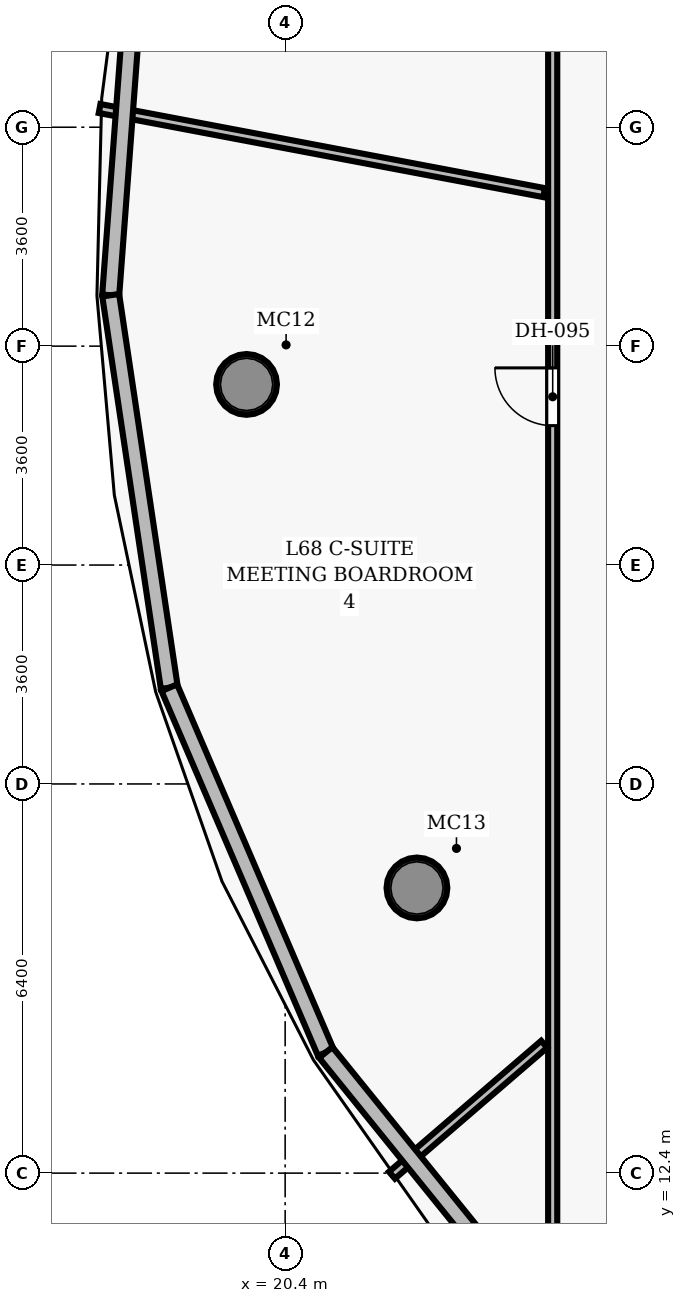
"""IFC4 building model, lengths in metres.
Left out: names, types, materials, properties, quantities, classifications, styles, units other than length and angle.
Written with IfcOpenShell. Run it as: python <this file> out.ifc"""

import sys

from ifc_helpers import new_model, si_unit, direction, frame, frame_2d, origin, origin_2d, place, context, subcontext, project, spatial, rectangle, hollow_circle, extrude, element, fill, save


model = new_model("IFC4")
c1 = context("Model", 3, precision=1e-05, world=origin(), true_north=direction((0.0, 1.0)))
c2 = subcontext(c1, "Body", "Model", "MODEL_VIEW")
j1 = project(units=[si_unit("LENGTHUNIT", "METRE"), si_unit("PLANEANGLEUNIT", "RADIAN")], contexts=[c1])
p1 = place(None, origin())
s1 = spatial("IfcSite", under=j1, at=p1, CompositionType="ELEMENT")
p2 = place(p1, origin())
s2 = spatial("IfcBuilding", under=s1, at=p2, CompositionType="ELEMENT")
p3 = place(p2, frame((0.0, 0.0, 269.0)))
s3 = spatial("IfcBuildingStorey", under=s2, at=p3, CompositionType="ELEMENT", Elevation=269.0)
for number, where, z_axis, x_axis in (
    (1, (19.765, 25.371, 0.0), (0.0, 0.0, 1.0), (1.0, 0.0, 0.0)),
    (2, (22.567, 17.09, 0.0), (0.0, 0.0, 1.0), (1.0, 0.0, 0.0)),
):
    element("IfcColumn", number, at=place(p3, frame(where, z_axis=z_axis, x_axis=x_axis)), inside=s3, PredefinedType="COLUMN", context=c2, shape_type="SweptSolid", body=[
        extrude(hollow_circle(Radius=0.5, WallThickness=0.045, at=origin_2d()), origin(), (0.0, 0.0, 1.0), 3.85),
    ])
p4 = place(p3, frame((24.8, 10.6, 0.0), z_axis=(0.0, 0.0, 1.0), x_axis=(0.0, 1.0, 0.0)))
e3 = element("IfcWall", 3, at=p4, inside=s3, PredefinedType="PARTITIONING", context=c2, shape_type="SweptSolid", body=[
    extrude(rectangle(XDim=30.8, YDim=0.15, at=frame_2d((15.4, 0.0))), origin(), (0.0, 0.0, 1.0), 3.04),
])
p5 = place(p4, frame((14.092, 0.0, 0.0)))
e4 = element("IfcOpeningElement", 4, at=p5, cuts=e3, PredefinedType="OPENING", context=c2, shape_type="SweptSolid", body=[
    extrude(rectangle(XDim=0.95, YDim=2.15, at=frame_2d((0.475, 1.075))), frame((0.0, 0.085, 0.0), z_axis=(0.0, -1.0, 0.0), x_axis=(1.0, 0.0, 0.0)), (0.0, 0.0, 1.0), 0.17),
])
p6 = place(p3, frame((24.66, 28.524, 0.0), z_axis=(0.0, 0.0, 1.0), x_axis=(-0.982569273903, 0.185896804659, 0.0)))
e5 = element("IfcWall", 5, at=p6, inside=s3, PredefinedType="PARTITIONING", context=c2, shape_type="SweptSolid", body=[
    extrude(rectangle(XDim=7.441, YDim=0.15, at=frame_2d((3.721, 0.0))), origin(), (0.0, 0.0, 1.0), 3.04),
])
p7 = place(p3, frame((24.66, 14.52, 0.0), z_axis=(0.0, 0.0, 1.0), x_axis=(-0.757950522392, -0.65231204619, 0.0)))
e6 = element("IfcWall", 6, at=p7, inside=s3, PredefinedType="PARTITIONING", context=c2, shape_type="SweptSolid", body=[
    extrude(rectangle(XDim=3.302, YDim=0.15, at=frame_2d((1.651, 0.0))), origin(), (0.0, 0.0, 1.0), 3.04),
])
p8 = place(p3, frame((17.531, 26.837, 0.0), z_axis=(0.0, 0.0, 1.0), x_axis=(0.074607246158, 0.997212995714, 0.0)))
e7 = element("IfcWall", 7, at=p8, inside=s3, PredefinedType="SOLIDWALL", context=c2, shape_type="SweptSolid", body=[
    extrude(rectangle(XDim=6.345, YDim=0.28, at=frame_2d((3.172, 0.0))), origin(), (0.0, 0.0, 1.0), 3.625),
])
p9 = place(p3, frame((18.494, 20.383, 0.0), z_axis=(0.0, 0.0, 1.0), x_axis=(-0.147656249056, 0.989038741463, 0.0)))
e8 = element("IfcWall", 8, at=p9, inside=s3, PredefinedType="SOLIDWALL", context=c2, shape_type="SweptSolid", body=[
    extrude(rectangle(XDim=6.526, YDim=0.28, at=frame_2d((3.263, 0.0))), origin(), (0.0, 0.0, 1.0), 3.625),
])
p10 = place(p3, frame((21.068, 14.385, 0.0), z_axis=(0.0, 0.0, 1.0), x_axis=(-0.394248824312, 0.919003734774, 0.0)))
e9 = element("IfcWall", 9, at=p10, inside=s3, PredefinedType="SOLIDWALL", context=c2, shape_type="SweptSolid", body=[
    extrude(rectangle(XDim=6.527, YDim=0.28, at=frame_2d((3.263, 0.0))), origin(), (0.0, 0.0, 1.0), 3.625),
])
p11 = place(p3, frame((25.174, 9.311, 0.0), z_axis=(0.0, 0.0, 1.0), x_axis=(-0.629055110494, 0.777360706469, 0.0)))
e10 = element("IfcWall", 10, at=p11, inside=s3, PredefinedType="SOLIDWALL", context=c2, shape_type="SweptSolid", body=[
    extrude(rectangle(XDim=6.527, YDim=0.28, at=frame_2d((3.264, 0.0))), origin(), (0.0, 0.0, 1.0), 3.625),
])
p12 = place(p5, origin())
e11 = element("IfcDoor", 11, at=p12, inside=s3, OperationType="SINGLE_SWING_RIGHT", PredefinedType="DOOR", context=c2, shape_type="SweptSolid", body=[
    extrude(rectangle(XDim=0.95, YDim=2.15, at=frame_2d((0.475, 1.075))), frame((0.0, 0.025, 0.0), z_axis=(0.0, -1.0, 0.0), x_axis=(1.0, 0.0, 0.0)), (0.0, 0.0, 1.0), 0.05),
])
fill(e4, e11)
save(model, sys.argv[1])
